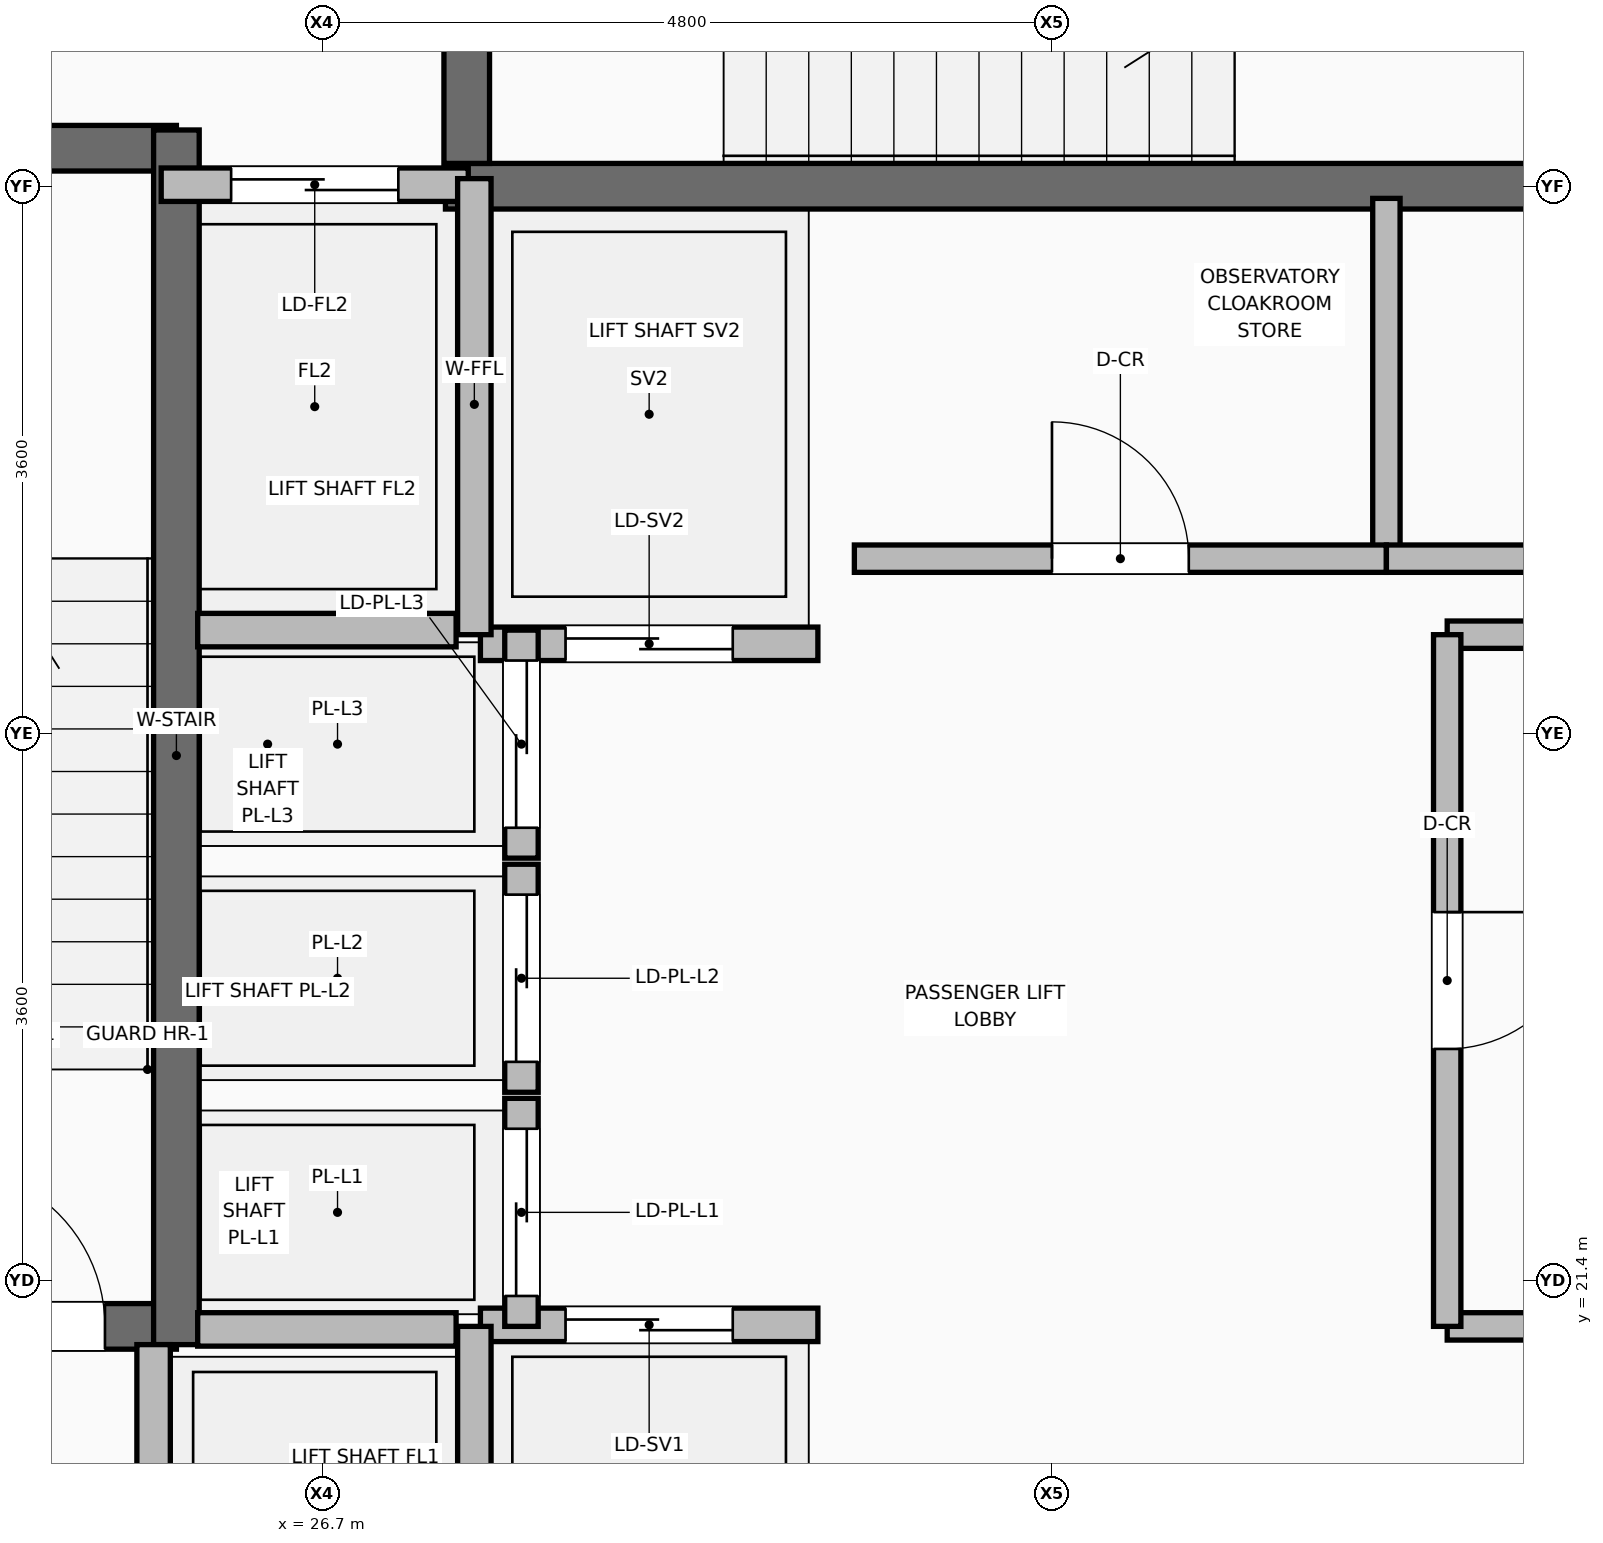
"""IFC4 building model, lengths in metres.
Left out: names, types, materials, properties, quantities, classifications, styles, units other than length and angle.
Written with IfcOpenShell. Run it as: python <this file> out.ifc"""

import sys

from ifc_helpers import new_model, si_unit, direction, frame, frame_2d, origin, place, context, subcontext, project, spatial, rectangle, extrude, element, fill, save


model = new_model("IFC4")
c1 = context("Model", 3, precision=1e-05, world=origin(), true_north=direction((0.0, 1.0)))
c2 = subcontext(c1, "Body", "Model", "MODEL_VIEW")
j1 = project(units=[si_unit("LENGTHUNIT", "METRE"), si_unit("PLANEANGLEUNIT", "RADIAN")], contexts=[c1])
p1 = place(None, origin())
s1 = spatial("IfcSite", under=j1, at=p1, CompositionType="ELEMENT")
p2 = place(p1, origin())
s2 = spatial("IfcBuilding", under=s1, at=p2, CompositionType="ELEMENT")
p3 = place(p2, frame((0.0, 0.0, -9.0)))
s3 = spatial("IfcBuildingStorey", under=s2, at=p3, CompositionType="ELEMENT", Elevation=-9.0)
p4 = place(p3, frame((22.225, 21.1, 0.0), z_axis=(0.0, 0.0, 1.0), x_axis=(1.0, 0.0, 0.0)))
e1 = element("IfcWall", 1, at=p4, inside=s3, PredefinedType="SHEAR", context=c2, shape_type="SweptSolid", body=[
    extrude(rectangle(XDim=3.515, YDim=0.3, at=frame_2d((1.757, 0.0))), origin(), (0.0, 0.0, 1.0), 4.25),
])
p5 = place(p4, frame((1.995, 0.0, 0.0)))
e2 = element("IfcOpeningElement", 2, at=p5, cuts=e1, PredefinedType="OPENING", context=c2, shape_type="SweptSolid", body=[
    extrude(rectangle(XDim=1.05, YDim=2.1, at=frame_2d((0.525, 1.05))), frame((0.0, 0.16, 0.0), z_axis=(0.0, -1.0, 0.0), x_axis=(1.0, 0.0, 0.0)), (0.0, 0.0, 1.0), 0.32),
])
p6 = place(p3, frame((22.225, 28.85, 0.0), z_axis=(0.0, 0.0, 1.0), x_axis=(1.0, 0.0, 0.0)))
e3 = element("IfcWall", 3, at=p6, inside=s3, PredefinedType="SHEAR", context=c2, shape_type="SweptSolid", body=[
    extrude(rectangle(XDim=3.515, YDim=0.3, at=frame_2d((1.757, 0.0))), origin(), (0.0, 0.0, 1.0), 4.25),
])
p7 = place(p3, frame((25.74, 20.98, 0.0), z_axis=(0.0, 0.0, 1.0), x_axis=(0.0, 1.0, 0.0)))
e4 = element("IfcWall", 4, at=p7, inside=s3, PredefinedType="SHEAR", context=c2, shape_type="SweptSolid", body=[
    extrude(rectangle(XDim=7.99, YDim=0.3, at=frame_2d((3.995, 0.0))), origin(), (0.0, 0.0, 1.0), 4.25),
])
p8 = place(p3, frame((27.51, 28.6, 0.0), z_axis=(0.0, 0.0, 1.0), x_axis=(1.0, 0.0, 0.0)))
e5 = element("IfcWall", 5, at=p8, inside=s3, PredefinedType="SHEAR", context=c2, shape_type="SweptSolid", body=[
    extrude(rectangle(XDim=8.03, YDim=0.3, at=frame_2d((4.015, 0.0))), origin(), (0.0, 0.0, 1.0), 4.25),
])
p9 = place(p3, frame((27.65, 28.75, 0.0), z_axis=(0.0, 0.0, 1.0), x_axis=(0.0, 1.0, 0.0)))
e6 = element("IfcWall", 6, at=p9, inside=s3, PredefinedType="SHEAR", context=c2, shape_type="SweptSolid", body=[
    extrude(rectangle(XDim=3.375, YDim=0.3, at=frame_2d((1.688, 0.0))), origin(), (0.0, 0.0, 1.0), 4.25),
])
p10 = place(p9, frame((1.0, 0.0, 0.0)))
e7 = element("IfcOpeningElement", 7, at=p10, cuts=e6, PredefinedType="OPENING", context=c2, shape_type="SweptSolid", body=[
    extrude(rectangle(XDim=1.05, YDim=2.1, at=frame_2d((0.525, 1.05))), frame((0.0, 0.16, 0.0), z_axis=(0.0, -1.0, 0.0), x_axis=(1.0, 0.0, 0.0)), (0.0, 0.0, 1.0), 0.32),
])
p11 = place(p3, frame((25.59, 18.22, 0.0), z_axis=(0.0, 0.0, 1.0), x_axis=(0.0, 1.0, 0.0)))
e8 = element("IfcWall", 8, at=p11, inside=s3, PredefinedType="PARTITIONING", context=c2, shape_type="SweptSolid", body=[
    extrude(rectangle(XDim=2.76, YDim=0.22, at=frame_2d((1.38, 0.0))), origin(), (0.0, 0.0, 1.0), 4.23),
])
p12 = place(p11, frame((0.83, 0.0, 0.0)))
e9 = element("IfcOpeningElement", 9, at=p12, cuts=e8, PredefinedType="OPENING", context=c2, shape_type="SweptSolid", body=[
    extrude(rectangle(XDim=1.1, YDim=2.2, at=frame_2d((0.55, 1.1))), frame((0.0, 0.12, 0.0), z_axis=(0.0, -1.0, 0.0), x_axis=(1.0, 0.0, 0.0)), (0.0, 0.0, 1.0), 0.24),
])
p13 = place(p3, frame((25.64, 28.61, 0.0), z_axis=(0.0, 0.0, 1.0), x_axis=(1.0, 0.0, 0.0)))
e10 = element("IfcWall", 10, at=p13, inside=s3, PredefinedType="PARTITIONING", context=c2, shape_type="SweptSolid", body=[
    extrude(rectangle(XDim=2.02, YDim=0.22, at=frame_2d((1.01, 0.0))), origin(), (0.0, 0.0, 1.0), 4.23),
])
p14 = place(p13, frame((0.46, 0.0, 0.0)))
e11 = element("IfcOpeningElement", 11, at=p14, cuts=e10, PredefinedType="OPENING", context=c2, shape_type="SweptSolid", body=[
    extrude(rectangle(XDim=1.1, YDim=2.2, at=frame_2d((0.55, 1.1))), frame((0.0, 0.12, 0.0), z_axis=(0.0, -1.0, 0.0), x_axis=(1.0, 0.0, 0.0)), (0.0, 0.0, 1.0), 0.24),
])
p15 = place(p3, frame((27.74, 21.11, 0.0), z_axis=(0.0, 0.0, 1.0), x_axis=(1.0, 0.0, 0.0)))
e12 = element("IfcWall", 12, at=p15, inside=s3, PredefinedType="PARTITIONING", context=c2, shape_type="SweptSolid", body=[
    extrude(rectangle(XDim=2.22, YDim=0.22, at=frame_2d((1.11, 0.0))), origin(), (0.0, 0.0, 1.0), 4.23),
])
p16 = place(p15, frame((0.56, 0.0, 0.0)))
e13 = element("IfcOpeningElement", 13, at=p16, cuts=e12, PredefinedType="OPENING", context=c2, shape_type="SweptSolid", body=[
    extrude(rectangle(XDim=1.1, YDim=2.2, at=frame_2d((0.55, 1.1))), frame((0.0, 0.12, 0.0), z_axis=(0.0, -1.0, 0.0), x_axis=(1.0, 0.0, 0.0)), (0.0, 0.0, 1.0), 0.24),
])
p17 = place(p3, frame((27.74, 25.59, 0.0), z_axis=(0.0, 0.0, 1.0), x_axis=(1.0, 0.0, 0.0)))
e14 = element("IfcWall", 14, at=p17, inside=s3, PredefinedType="PARTITIONING", context=c2, shape_type="SweptSolid", body=[
    extrude(rectangle(XDim=2.22, YDim=0.22, at=frame_2d((1.11, 0.0))), origin(), (0.0, 0.0, 1.0), 4.23),
])
p18 = place(p17, frame((0.56, 0.0, 0.0)))
e15 = element("IfcOpeningElement", 15, at=p18, cuts=e14, PredefinedType="OPENING", context=c2, shape_type="SweptSolid", body=[
    extrude(rectangle(XDim=1.1, YDim=2.2, at=frame_2d((0.55, 1.1))), frame((0.0, 0.12, 0.0), z_axis=(0.0, -1.0, 0.0), x_axis=(1.0, 0.0, 0.0)), (0.0, 0.0, 1.0), 0.24),
])
p19 = place(p3, frame((28.01, 21.1, 0.0), z_axis=(0.0, 0.0, 1.0), x_axis=(0.0, 1.0, 0.0)))
e16 = element("IfcWall", 16, at=p19, inside=s3, PredefinedType="PARTITIONING", context=c2, shape_type="SweptSolid", body=[
    extrude(rectangle(XDim=1.5, YDim=0.22, at=frame_2d((0.75, 0.0))), origin(), (0.0, 0.0, 1.0), 4.23),
])
p20 = place(p19, frame((0.2, 0.0, 0.0)))
e17 = element("IfcOpeningElement", 17, at=p20, cuts=e16, PredefinedType="OPENING", context=c2, shape_type="SweptSolid", body=[
    extrude(rectangle(XDim=1.1, YDim=2.2, at=frame_2d((0.55, 1.1))), frame((0.0, 0.12, 0.0), z_axis=(0.0, -1.0, 0.0), x_axis=(1.0, 0.0, 0.0)), (0.0, 0.0, 1.0), 0.24),
])
p21 = place(p3, frame((28.01, 22.64, 0.0), z_axis=(0.0, 0.0, 1.0), x_axis=(0.0, 1.0, 0.0)))
e18 = element("IfcWall", 18, at=p21, inside=s3, PredefinedType="PARTITIONING", context=c2, shape_type="SweptSolid", body=[
    extrude(rectangle(XDim=1.5, YDim=0.22, at=frame_2d((0.75, 0.0))), origin(), (0.0, 0.0, 1.0), 4.23),
])
p22 = place(p21, frame((0.2, 0.0, 0.0)))
e19 = element("IfcOpeningElement", 19, at=p22, cuts=e18, PredefinedType="OPENING", context=c2, shape_type="SweptSolid", body=[
    extrude(rectangle(XDim=1.1, YDim=2.2, at=frame_2d((0.55, 1.1))), frame((0.0, 0.12, 0.0), z_axis=(0.0, -1.0, 0.0), x_axis=(1.0, 0.0, 0.0)), (0.0, 0.0, 1.0), 0.24),
])
p23 = place(p3, frame((28.01, 24.18, 0.0), z_axis=(0.0, 0.0, 1.0), x_axis=(0.0, 1.0, 0.0)))
e20 = element("IfcWall", 20, at=p23, inside=s3, PredefinedType="PARTITIONING", context=c2, shape_type="SweptSolid", body=[
    extrude(rectangle(XDim=1.5, YDim=0.22, at=frame_2d((0.75, 0.0))), origin(), (0.0, 0.0, 1.0), 4.23),
])
p24 = place(p23, frame((0.2, 0.0, 0.0)))
e21 = element("IfcOpeningElement", 21, at=p24, cuts=e20, PredefinedType="OPENING", context=c2, shape_type="SweptSolid", body=[
    extrude(rectangle(XDim=1.1, YDim=2.2, at=frame_2d((0.55, 1.1))), frame((0.0, 0.12, 0.0), z_axis=(0.0, -1.0, 0.0), x_axis=(1.0, 0.0, 0.0)), (0.0, 0.0, 1.0), 0.24),
])
p25 = place(p3, frame((27.7, 18.15, 0.0), z_axis=(0.0, 0.0, 1.0), x_axis=(0.0, 1.0, 0.0)))
e22 = element("IfcWall", 22, at=p25, inside=s3, PredefinedType="PARTITIONING", context=c2, shape_type="SweptSolid", body=[
    extrude(rectangle(XDim=2.95, YDim=0.22, at=frame_2d((1.475, 0.0))), origin(), (0.0, 0.0, 1.0), 4.23),
])
p26 = place(p3, frame((27.7, 25.65, 0.0), z_axis=(0.0, 0.0, 1.0), x_axis=(0.0, 1.0, 0.0)))
e23 = element("IfcWall", 23, at=p26, inside=s3, PredefinedType="PARTITIONING", context=c2, shape_type="SweptSolid", body=[
    extrude(rectangle(XDim=3.0, YDim=0.22, at=frame_2d((1.5, 0.0))), origin(), (0.0, 0.0, 1.0), 4.23),
])
for number, where, z_axis, x_axis in (
    (24, (25.88, 21.08, 0.0), (0.0, 0.0, 1.0), (1.0, 0.0, 0.0)),
    (25, (25.88, 25.68, 0.0), (0.0, 0.0, 1.0), (1.0, 0.0, 0.0)),
):
    element("IfcWall", number, at=place(p3, frame(where, z_axis=z_axis, x_axis=x_axis)), inside=s3, PredefinedType="PARTITIONING", context=c2, shape_type="SweptSolid", body=[
        extrude(rectangle(XDim=1.7, YDim=0.22, at=frame_2d((0.85, 0.0))), origin(), (0.0, 0.0, 1.0), 4.23),
    ])
p27 = place(p3, frame((34.1, 21.1, 0.0), z_axis=(0.0, 0.0, 1.0), x_axis=(1.0, 0.0, 0.0)))
e26 = element("IfcWall", 26, at=p27, inside=s3, PredefinedType="PARTITIONING", context=c2, shape_type="SweptSolid", body=[
    extrude(rectangle(XDim=0.88, YDim=0.18, at=frame_2d((0.44, 0.0))), origin(), (0.0, 0.0, 1.0), 4.23),
])
p28 = place(p3, frame((34.1, 25.65, 0.0), z_axis=(0.0, 0.0, 1.0), x_axis=(1.0, 0.0, 0.0)))
e27 = element("IfcWall", 27, at=p28, inside=s3, PredefinedType="PARTITIONING", context=c2, shape_type="SweptSolid", body=[
    extrude(rectangle(XDim=0.66, YDim=0.18, at=frame_2d((0.33, 0.0))), origin(), (0.0, 0.0, 1.0), 4.23),
])
p29 = place(p3, frame((34.1, 21.1, 0.0), z_axis=(0.0, 0.0, 1.0), x_axis=(0.0, 1.0, 0.0)))
e28 = element("IfcWall", 28, at=p29, inside=s3, PredefinedType="PARTITIONING", context=c2, shape_type="SweptSolid", body=[
    extrude(rectangle(XDim=4.55, YDim=0.18, at=frame_2d((2.275, 0.0))), origin(), (0.0, 0.0, 1.0), 4.23),
])
p30 = place(p29, frame((1.825, 0.0, 0.0)))
e29 = element("IfcOpeningElement", 29, at=p30, cuts=e28, PredefinedType="OPENING", context=c2, shape_type="SweptSolid", body=[
    extrude(rectangle(XDim=0.9, YDim=2.1, at=frame_2d((0.45, 1.05))), frame((0.0, 0.1, 0.0), z_axis=(0.0, -1.0, 0.0), x_axis=(1.0, 0.0, 0.0)), (0.0, 0.0, 1.0), 0.2),
])
p31 = place(p3, frame((33.7, 26.15, 0.0), z_axis=(0.0, 0.0, 1.0), x_axis=(0.0, 1.0, 0.0)))
e30 = element("IfcWall", 30, at=p31, inside=s3, PredefinedType="PARTITIONING", context=c2, shape_type="SweptSolid", body=[
    extrude(rectangle(XDim=2.37, YDim=0.18, at=frame_2d((1.185, 0.0))), origin(), (0.0, 0.0, 1.0), 4.23),
])
p32 = place(p3, frame((30.2, 26.15, 0.0), z_axis=(0.0, 0.0, 1.0), x_axis=(1.0, 0.0, 0.0)))
e31 = element("IfcWall", 31, at=p32, inside=s3, PredefinedType="PARTITIONING", context=c2, shape_type="SweptSolid", body=[
    extrude(rectangle(XDim=3.5, YDim=0.18, at=frame_2d((1.75, 0.0))), origin(), (0.0, 0.0, 1.0), 4.23),
])
p33 = place(p32, frame((1.3, 0.0, 0.0)))
e32 = element("IfcOpeningElement", 32, at=p33, cuts=e31, PredefinedType="OPENING", context=c2, shape_type="SweptSolid", body=[
    extrude(rectangle(XDim=0.9, YDim=2.1, at=frame_2d((0.45, 1.05))), frame((0.0, 0.1, 0.0), z_axis=(0.0, -1.0, 0.0), x_axis=(1.0, 0.0, 0.0)), (0.0, 0.0, 1.0), 0.2),
])
p34 = place(p3, frame((33.7, 26.15, 0.0), z_axis=(0.0, 0.0, 1.0), x_axis=(1.0, 0.0, 0.0)))
e33 = element("IfcWall", 33, at=p34, inside=s3, PredefinedType="PARTITIONING", context=c2, shape_type="SweptSolid", body=[
    extrude(rectangle(XDim=3.45, YDim=0.18, at=frame_2d((1.725, 0.0))), origin(), (0.0, 0.0, 1.0), 4.23),
])
p35 = place(p34, frame((1.275, 0.0, 0.0)))
e34 = element("IfcOpeningElement", 34, at=p35, cuts=e33, PredefinedType="OPENING", context=c2, shape_type="SweptSolid", body=[
    extrude(rectangle(XDim=0.9, YDim=2.1, at=frame_2d((0.45, 1.05))), frame((0.0, 0.1, 0.0), z_axis=(0.0, -1.0, 0.0), x_axis=(1.0, 0.0, 0.0)), (0.0, 0.0, 1.0), 0.2),
])
p36 = place(p5, origin())
e35 = element("IfcDoor", 35, at=p36, inside=s3, OperationType="SINGLE_SWING_LEFT", PredefinedType="DOOR", context=c2, shape_type="SweptSolid", body=[
    extrude(rectangle(XDim=1.05, YDim=2.1, at=frame_2d((0.525, 1.05))), frame((0.0, 0.025, 0.0), z_axis=(0.0, -1.0, 0.0), x_axis=(1.0, 0.0, 0.0)), (0.0, 0.0, 1.0), 0.05),
])
fill(e2, e35)
p37 = place(p14, origin())
e36 = element("IfcDoor", 36, at=p37, inside=s3, OperationType="DOUBLE_DOOR_SLIDING", PredefinedType="DOOR", context=c2, shape_type="SweptSolid", body=[
    extrude(rectangle(XDim=1.1, YDim=2.2, at=frame_2d((0.55, 1.1))), frame((0.0, 0.025, 0.0), z_axis=(0.0, -1.0, 0.0), x_axis=(1.0, 0.0, 0.0)), (0.0, 0.0, 1.0), 0.05),
])
fill(e11, e36)
p38 = place(p16, origin())
e37 = element("IfcDoor", 37, at=p38, inside=s3, OperationType="DOUBLE_DOOR_SLIDING", PredefinedType="DOOR", context=c2, shape_type="SweptSolid", body=[
    extrude(rectangle(XDim=1.1, YDim=2.2, at=frame_2d((0.55, 1.1))), frame((0.0, 0.025, 0.0), z_axis=(0.0, -1.0, 0.0), x_axis=(1.0, 0.0, 0.0)), (0.0, 0.0, 1.0), 0.05),
])
fill(e13, e37)
p39 = place(p18, frame((1.1, 0.0, 0.0), z_axis=(0.0, 0.0, 1.0), x_axis=(-1.0, 0.0, 0.0)))
e38 = element("IfcDoor", 38, at=p39, inside=s3, OperationType="DOUBLE_DOOR_SLIDING", PredefinedType="DOOR", context=c2, shape_type="SweptSolid", body=[
    extrude(rectangle(XDim=1.1, YDim=2.2, at=frame_2d((0.55, 1.1))), frame((0.0, 0.025, 0.0), z_axis=(0.0, -1.0, 0.0), x_axis=(1.0, 0.0, 0.0)), (0.0, 0.0, 1.0), 0.05),
])
fill(e15, e38)
p40 = place(p20, frame((1.1, 0.0, 0.0), z_axis=(0.0, 0.0, 1.0), x_axis=(-1.0, 0.0, 0.0)))
e39 = element("IfcDoor", 39, at=p40, inside=s3, OperationType="DOUBLE_DOOR_SLIDING", PredefinedType="DOOR", context=c2, shape_type="SweptSolid", body=[
    extrude(rectangle(XDim=1.1, YDim=2.2, at=frame_2d((0.55, 1.1))), frame((0.0, 0.025, 0.0), z_axis=(0.0, -1.0, 0.0), x_axis=(1.0, 0.0, 0.0)), (0.0, 0.0, 1.0), 0.05),
])
fill(e17, e39)
p41 = place(p22, frame((1.1, 0.0, 0.0), z_axis=(0.0, 0.0, 1.0), x_axis=(-1.0, 0.0, 0.0)))
e40 = element("IfcDoor", 40, at=p41, inside=s3, OperationType="DOUBLE_DOOR_SLIDING", PredefinedType="DOOR", context=c2, shape_type="SweptSolid", body=[
    extrude(rectangle(XDim=1.1, YDim=2.2, at=frame_2d((0.55, 1.1))), frame((0.0, 0.025, 0.0), z_axis=(0.0, -1.0, 0.0), x_axis=(1.0, 0.0, 0.0)), (0.0, 0.0, 1.0), 0.05),
])
fill(e19, e40)
p42 = place(p24, frame((1.1, 0.0, 0.0), z_axis=(0.0, 0.0, 1.0), x_axis=(-1.0, 0.0, 0.0)))
e41 = element("IfcDoor", 41, at=p42, inside=s3, OperationType="DOUBLE_DOOR_SLIDING", PredefinedType="DOOR", context=c2, shape_type="SweptSolid", body=[
    extrude(rectangle(XDim=1.1, YDim=2.2, at=frame_2d((0.55, 1.1))), frame((0.0, 0.025, 0.0), z_axis=(0.0, -1.0, 0.0), x_axis=(1.0, 0.0, 0.0)), (0.0, 0.0, 1.0), 0.05),
])
fill(e21, e41)
p43 = place(p30, frame((0.9, 0.0, 0.0), z_axis=(0.0, 0.0, 1.0), x_axis=(-1.0, 0.0, 0.0)))
e42 = element("IfcDoor", 42, at=p43, inside=s3, OperationType="SINGLE_SWING_LEFT", PredefinedType="DOOR", context=c2, shape_type="SweptSolid", body=[
    extrude(rectangle(XDim=0.9, YDim=2.1, at=frame_2d((0.45, 1.05))), frame((0.0, 0.025, 0.0), z_axis=(0.0, -1.0, 0.0), x_axis=(1.0, 0.0, 0.0)), (0.0, 0.0, 1.0), 0.05),
])
fill(e29, e42)
p44 = place(p33, origin())
e43 = element("IfcDoor", 43, at=p44, inside=s3, OperationType="SINGLE_SWING_LEFT", PredefinedType="DOOR", context=c2, shape_type="SweptSolid", body=[
    extrude(rectangle(XDim=0.9, YDim=2.1, at=frame_2d((0.45, 1.05))), frame((0.0, 0.025, 0.0), z_axis=(0.0, -1.0, 0.0), x_axis=(1.0, 0.0, 0.0)), (0.0, 0.0, 1.0), 0.05),
])
fill(e32, e43)
save(model, sys.argv[1])
